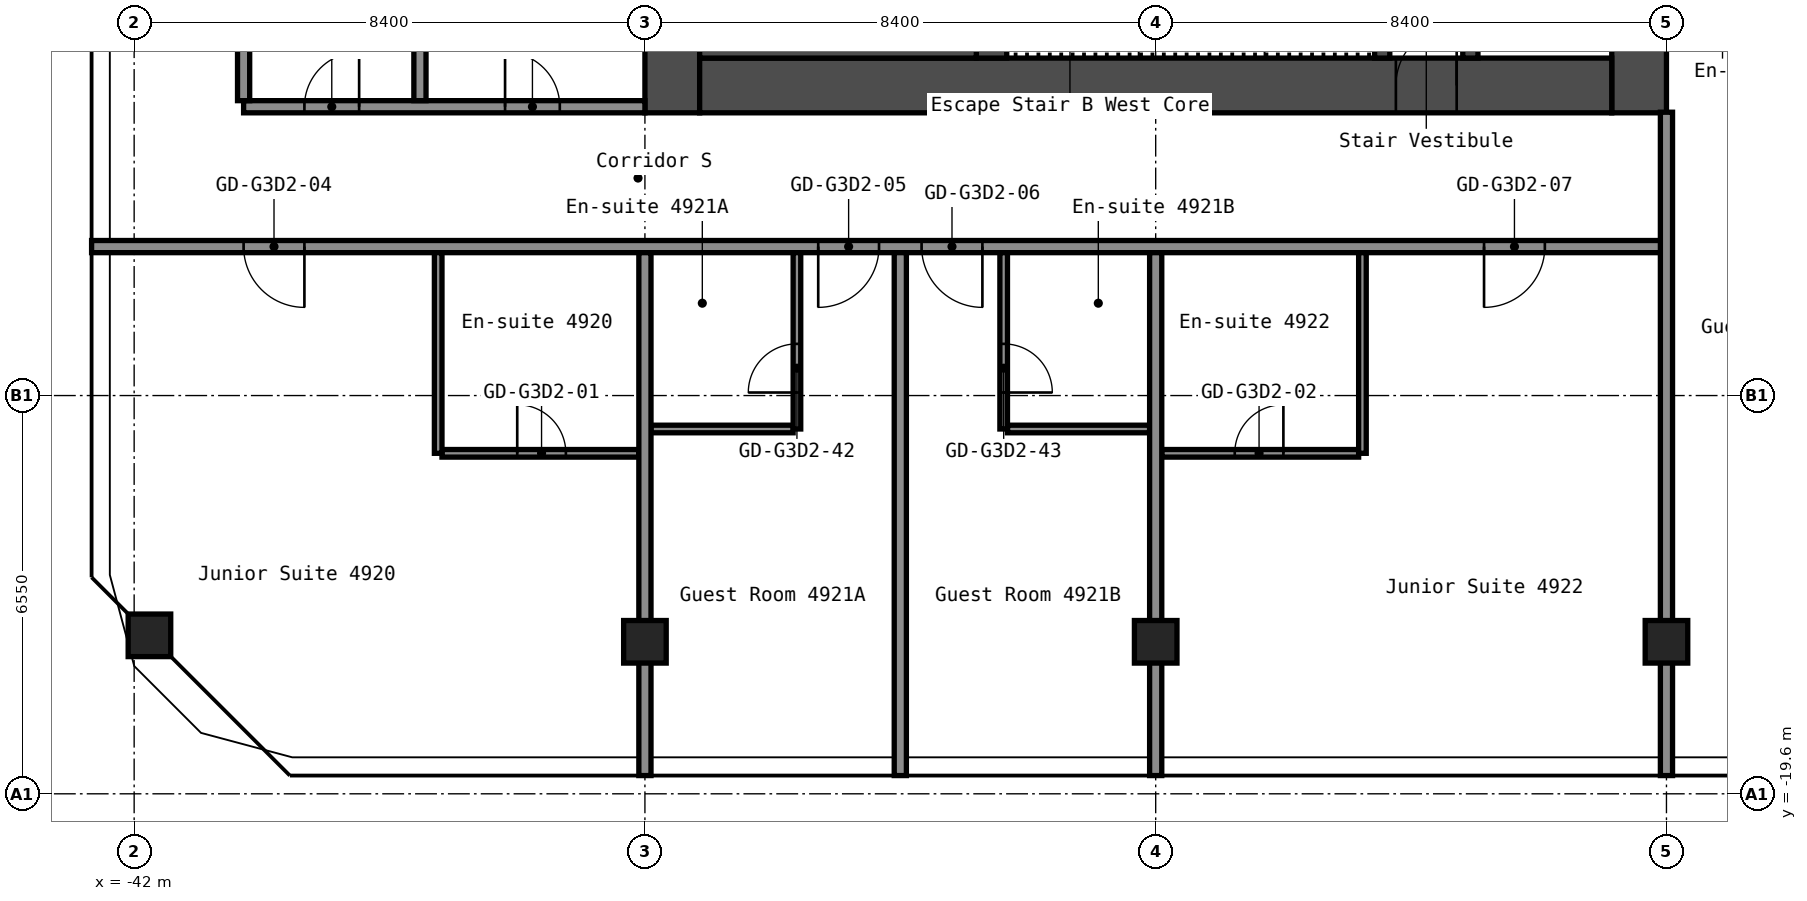
"""IFC4 building model, lengths in metres.
Left out: names, types, materials, properties, quantities, classifications, styles, units other than length and angle.
Written with IfcOpenShell. Run it as: python <this file> out.ifc"""

import sys

from ifc_helpers import new_model, si_unit, direction, frame, frame_2d, origin, origin_2d, place, context, subcontext, project, spatial, rectangle, hollow_rectangle, extrude, element, fill, save


model = new_model("IFC4")
c1 = context("Model", 3, precision=1e-05, world=origin(), true_north=direction((0.0, 1.0)))
c2 = subcontext(c1, "Body", "Model", "MODEL_VIEW")
j1 = project(units=[si_unit("LENGTHUNIT", "METRE"), si_unit("PLANEANGLEUNIT", "RADIAN")], contexts=[c1])
p1 = place(None, origin())
s1 = spatial("IfcSite", under=j1, at=p1, CompositionType="ELEMENT")
p2 = place(p1, origin())
s2 = spatial("IfcBuilding", under=s1, at=p2, CompositionType="ELEMENT")
p3 = place(p2, frame((0.0, 0.0, 172.6)))
s3 = spatial("IfcBuildingStorey", under=s2, at=p3, CompositionType="ELEMENT", Elevation=172.6)
for number, where, z_axis, x_axis in (
    (1, (-41.749, -16.994, 0.0), (0.0, 0.0, 1.0), (1.0, 0.0, 0.0)),
    (2, (-33.6, -17.1, 0.0), (0.0, 0.0, 1.0), (1.0, 0.0, 0.0)),
    (3, (-25.2, -17.1, 0.0), (0.0, 0.0, 1.0), (1.0, 0.0, 0.0)),
    (4, (-16.8, -17.1, 0.0), (0.0, 0.0, 1.0), (1.0, 0.0, 0.0)),
):
    element("IfcColumn", number, at=place(p3, frame(where, z_axis=z_axis, x_axis=x_axis)), inside=s3, PredefinedType="COLUMN", context=c2, shape_type="SweptSolid", body=[
        extrude(hollow_rectangle(XDim=0.7, YDim=0.7, WallThickness=0.028, at=origin_2d()), origin(), (0.0, 0.0, 1.0), 2.9),
    ])
p4 = place(p3, frame((-17.25, -8.4, 0.0), z_axis=(0.0, 0.0, 1.0), x_axis=(0.0, 1.0, 0.0)))
e5 = element("IfcWall", 5, at=p4, inside=s3, PredefinedType="SHEAR", context=c2, shape_type="SweptSolid", body=[
    extrude(rectangle(XDim=16.8, YDim=0.9, at=frame_2d((8.4, 0.0))), origin(), (0.0, 0.0, 1.0), 2.9),
])
p5 = place(p4, frame((7.1, 0.0, 0.0)))
e6 = element("IfcOpeningElement", 6, at=p5, cuts=e5, PredefinedType="OPENING", context=c2, shape_type="SweptSolid", body=[
    extrude(rectangle(XDim=1.6, YDim=2.1, at=frame_2d((0.8, 1.05))), frame((0.0, 0.46, 0.0), z_axis=(0.0, -1.0, 0.0), x_axis=(1.0, 0.0, 0.0)), (0.0, 0.0, 1.0), 0.92),
])
p6 = place(p3, frame((-33.15, -8.4, 0.0), z_axis=(0.0, 0.0, 1.0), x_axis=(0.0, 1.0, 0.0)))
e7 = element("IfcWall", 7, at=p6, inside=s3, PredefinedType="SHEAR", context=c2, shape_type="SweptSolid", body=[
    extrude(rectangle(XDim=16.8, YDim=0.9, at=frame_2d((8.4, 0.0))), origin(), (0.0, 0.0, 1.0), 2.9),
])
p7 = place(p3, frame((-32.7, -7.95, 0.0), z_axis=(0.0, 0.0, 1.0), x_axis=(1.0, 0.0, 0.0)))
e8 = element("IfcWall", 8, at=p7, inside=s3, PredefinedType="SHEAR", context=c2, shape_type="SweptSolid", body=[
    extrude(rectangle(XDim=15.0, YDim=0.9, at=frame_2d((7.5, 0.0))), origin(), (0.0, 0.0, 1.0), 2.9),
])
p8 = place(p7, frame((11.45, 0.0, 0.0)))
e9 = element("IfcOpeningElement", 9, at=p8, cuts=e8, PredefinedType="OPENING", context=c2, shape_type="SweptSolid", body=[
    extrude(rectangle(XDim=1.0, YDim=2.1, at=frame_2d((0.5, 1.05))), frame((0.0, 0.46, 0.0), z_axis=(0.0, -1.0, 0.0), x_axis=(1.0, 0.0, 0.0)), (0.0, 0.0, 1.0), 0.92),
])
p9 = place(p3, frame((-20.025, -7.5, 0.0), z_axis=(0.0, 0.0, 1.0), x_axis=(0.0, 1.0, 0.0)))
e10 = element("IfcWall", 10, at=p9, inside=s3, PredefinedType="SHEAR", context=c2, shape_type="SweptSolid", body=[
    extrude(rectangle(XDim=6.3, YDim=0.25, at=frame_2d((3.15, 0.0))), origin(), (0.0, 0.0, 1.0), 2.9),
])
p10 = place(p9, frame((2.4, 0.0, 0.0)))
e11 = element("IfcOpeningElement", 11, at=p10, cuts=e10, PredefinedType="OPENING", context=c2, shape_type="SweptSolid", body=[
    extrude(rectangle(XDim=1.0, YDim=2.1, at=frame_2d((0.5, 1.05))), frame((0.0, 0.135, 0.0), z_axis=(0.0, -1.0, 0.0), x_axis=(1.0, 0.0, 0.0)), (0.0, 0.0, 1.0), 0.27),
])
p11 = place(p3, frame((-21.475, -7.5, 0.0), z_axis=(0.0, 0.0, 1.0), x_axis=(0.0, 1.0, 0.0)))
e12 = element("IfcWall", 12, at=p11, inside=s3, PredefinedType="SHEAR", context=c2, shape_type="SweptSolid", body=[
    extrude(rectangle(XDim=3.75, YDim=0.25, at=frame_2d((1.875, 0.0))), origin(), (0.0, 0.0, 1.0), 2.9),
])
p12 = place(p11, frame((1.3, 0.0, 0.0)))
e13 = element("IfcOpeningElement", 13, at=p12, cuts=e12, PredefinedType="OPENING", context=c2, shape_type="SweptSolid", body=[
    extrude(rectangle(XDim=1.2, YDim=2.1, at=frame_2d((0.6, 1.05))), frame((0.0, 0.135, 0.0), z_axis=(0.0, -1.0, 0.0), x_axis=(1.0, 0.0, 0.0)), (0.0, 0.0, 1.0), 0.27),
])
p13 = place(p3, frame((-27.9, -7.5, 0.0), z_axis=(0.0, 0.0, 1.0), x_axis=(0.0, 1.0, 0.0)))
e14 = element("IfcWall", 14, at=p13, inside=s3, PredefinedType="SHEAR", context=c2, shape_type="SweptSolid", body=[
    extrude(rectangle(XDim=3.75, YDim=0.5, at=frame_2d((1.875, 0.0))), origin(), (0.0, 0.0, 1.0), 2.9),
])
p14 = place(p3, frame((-32.7, -6.75, 0.0), z_axis=(0.0, 0.0, 1.0), x_axis=(1.0, 0.0, 0.0)))
e15 = element("IfcWall", 15, at=p14, inside=s3, PredefinedType="SHEAR", context=c2, shape_type="SweptSolid", body=[
    extrude(rectangle(XDim=4.55, YDim=1.5, at=frame_2d((2.275, 0.0))), origin(), (0.0, 0.0, 1.0), 2.9),
])
p15 = place(p3, frame((-36.938, -14.0, 0.0), z_axis=(0.0, 0.0, 1.0), x_axis=(1.0, 0.0, 0.0)))
e16 = element("IfcWall", 16, at=p15, inside=s3, PredefinedType="PARTITIONING", context=c2, shape_type="SweptSolid", body=[
    extrude(rectangle(XDim=3.238, YDim=0.125, at=frame_2d((1.619, 0.0))), origin(), (0.0, 0.0, 1.0), 2.9),
])
p16 = place(p15, frame((1.238, 0.0, 0.0)))
e17 = element("IfcOpeningElement", 17, at=p16, cuts=e16, PredefinedType="OPENING", context=c2, shape_type="SweptSolid", body=[
    extrude(rectangle(XDim=0.8, YDim=2.1, at=frame_2d((0.4, 1.05))), frame((0.0, 0.073, 0.0), z_axis=(0.0, -1.0, 0.0), x_axis=(1.0, 0.0, 0.0)), (0.0, 0.0, 1.0), 0.145),
])
p17 = place(p3, frame((-25.1, -14.0, 0.0), z_axis=(0.0, 0.0, 1.0), x_axis=(1.0, 0.0, 0.0)))
e18 = element("IfcWall", 18, at=p17, inside=s3, PredefinedType="PARTITIONING", context=c2, shape_type="SweptSolid", body=[
    extrude(rectangle(XDim=3.238, YDim=0.125, at=frame_2d((1.619, 0.0))), origin(), (0.0, 0.0, 1.0), 2.9),
])
p18 = place(p17, frame((1.2, 0.0, 0.0)))
e19 = element("IfcOpeningElement", 19, at=p18, cuts=e18, PredefinedType="OPENING", context=c2, shape_type="SweptSolid", body=[
    extrude(rectangle(XDim=0.8, YDim=2.1, at=frame_2d((0.4, 1.05))), frame((0.0, 0.073, 0.0), z_axis=(0.0, -1.0, 0.0), x_axis=(1.0, 0.0, 0.0)), (0.0, 0.0, 1.0), 0.145),
])
for number, where, z_axis, x_axis in (
    (20, (-33.5, -13.6, 0.0), (0.0, 0.0, 1.0), (1.0, 0.0, 0.0)),
    (21, (-27.637, -13.6, 0.0), (0.0, 0.0, 1.0), (1.0, 0.0, 0.0)),
):
    element("IfcWall", number, at=place(p3, frame(where, z_axis=z_axis, x_axis=x_axis)), inside=s3, PredefinedType="PARTITIONING", context=c2, shape_type="SweptSolid", body=[
        extrude(rectangle(XDim=2.337, YDim=0.125, at=frame_2d((1.169, 0.0))), origin(), (0.0, 0.0, 1.0), 2.9),
    ])
p19 = place(p3, frame((-42.7, -10.6, 0.0), z_axis=(0.0, 0.0, 1.0), x_axis=(1.0, 0.0, 0.0)))
e22 = element("IfcWall", 22, at=p19, inside=s3, PredefinedType="PARTITIONING", context=c2, shape_type="SweptSolid", body=[
    extrude(rectangle(XDim=25.9, YDim=0.2, at=frame_2d((12.95, 0.0))), origin(), (0.0, 0.0, 1.0), 2.9),
])
p20 = place(p19, frame((2.5, 0.0, 0.0)))
e23 = element("IfcOpeningElement", 23, at=p20, cuts=e22, PredefinedType="OPENING", context=c2, shape_type="SweptSolid", body=[
    extrude(rectangle(XDim=1.0, YDim=2.1, at=frame_2d((0.5, 1.05))), frame((0.0, 0.11, 0.0), z_axis=(0.0, -1.0, 0.0), x_axis=(1.0, 0.0, 0.0)), (0.0, 0.0, 1.0), 0.22),
])
p21 = place(p19, frame((11.95, 0.0, 0.0)))
e24 = element("IfcOpeningElement", 24, at=p21, cuts=e22, PredefinedType="OPENING", context=c2, shape_type="SweptSolid", body=[
    extrude(rectangle(XDim=1.0, YDim=2.1, at=frame_2d((0.5, 1.05))), frame((0.0, 0.11, 0.0), z_axis=(0.0, -1.0, 0.0), x_axis=(1.0, 0.0, 0.0)), (0.0, 0.0, 1.0), 0.22),
])
p22 = place(p19, frame((13.65, 0.0, 0.0)))
e25 = element("IfcOpeningElement", 25, at=p22, cuts=e22, PredefinedType="OPENING", context=c2, shape_type="SweptSolid", body=[
    extrude(rectangle(XDim=1.0, YDim=2.1, at=frame_2d((0.5, 1.05))), frame((0.0, 0.11, 0.0), z_axis=(0.0, -1.0, 0.0), x_axis=(1.0, 0.0, 0.0)), (0.0, 0.0, 1.0), 0.22),
])
p23 = place(p19, frame((22.9, 0.0, 0.0)))
e26 = element("IfcOpeningElement", 26, at=p23, cuts=e22, PredefinedType="OPENING", context=c2, shape_type="SweptSolid", body=[
    extrude(rectangle(XDim=1.0, YDim=2.1, at=frame_2d((0.5, 1.05))), frame((0.0, 0.11, 0.0), z_axis=(0.0, -1.0, 0.0), x_axis=(1.0, 0.0, 0.0)), (0.0, 0.0, 1.0), 0.22),
])
p24 = place(p3, frame((-40.2, -8.3, 0.0), z_axis=(0.0, 0.0, 1.0), x_axis=(1.0, 0.0, 0.0)))
e27 = element("IfcWall", 27, at=p24, inside=s3, PredefinedType="PARTITIONING", context=c2, shape_type="SweptSolid", body=[
    extrude(rectangle(XDim=6.6, YDim=0.2, at=frame_2d((3.3, 0.0))), origin(), (0.0, 0.0, 1.0), 2.9),
])
p25 = place(p24, frame((1.0, 0.0, 0.0)))
e28 = element("IfcOpeningElement", 28, at=p25, cuts=e27, PredefinedType="OPENING", context=c2, shape_type="SweptSolid", body=[
    extrude(rectangle(XDim=0.9, YDim=2.1, at=frame_2d((0.45, 1.05))), frame((0.0, 0.11, 0.0), z_axis=(0.0, -1.0, 0.0), x_axis=(1.0, 0.0, 0.0)), (0.0, 0.0, 1.0), 0.22),
])
p26 = place(p24, frame((4.3, 0.0, 0.0)))
e29 = element("IfcOpeningElement", 29, at=p26, cuts=e27, PredefinedType="OPENING", context=c2, shape_type="SweptSolid", body=[
    extrude(rectangle(XDim=0.9, YDim=2.1, at=frame_2d((0.45, 1.05))), frame((0.0, 0.11, 0.0), z_axis=(0.0, -1.0, 0.0), x_axis=(1.0, 0.0, 0.0)), (0.0, 0.0, 1.0), 0.22),
])
p27 = place(p3, frame((-40.2, -8.2, 0.0), z_axis=(0.0, 0.0, 1.0), x_axis=(0.0, 1.0, 0.0)))
e30 = element("IfcWall", 30, at=p27, inside=s3, PredefinedType="PARTITIONING", context=c2, shape_type="SweptSolid", body=[
    extrude(rectangle(XDim=16.4, YDim=0.2, at=frame_2d((8.2, 0.0))), origin(), (0.0, 0.0, 1.0), 2.9),
])
p28 = place(p3, frame((-37.3, -8.2, 0.0), z_axis=(0.0, 0.0, 1.0), x_axis=(0.0, 1.0, 0.0)))
e31 = element("IfcWall", 31, at=p28, inside=s3, PredefinedType="PARTITIONING", context=c2, shape_type="SweptSolid", body=[
    extrude(rectangle(XDim=8.2, YDim=0.2, at=frame_2d((4.1, 0.0))), origin(), (0.0, 0.0, 1.0), 2.9),
])
p29 = place(p3, frame((-37.0, -14.0, 0.0), z_axis=(0.0, 0.0, 1.0), x_axis=(0.0, 1.0, 0.0)))
e32 = element("IfcWall", 32, at=p29, inside=s3, PredefinedType="PARTITIONING", context=c2, shape_type="SweptSolid", body=[
    extrude(rectangle(XDim=3.3, YDim=0.125, at=frame_2d((1.65, 0.0))), origin(), (0.0, 0.0, 1.0), 2.9),
])
p30 = place(p3, frame((-33.6, -19.3, 0.0), z_axis=(0.0, 0.0, 1.0), x_axis=(0.0, 1.0, 0.0)))
e33 = element("IfcWall", 33, at=p30, inside=s3, PredefinedType="PARTITIONING", context=c2, shape_type="SweptSolid", body=[
    extrude(rectangle(XDim=8.6, YDim=0.2, at=frame_2d((4.3, 0.0))), origin(), (0.0, 0.0, 1.0), 2.9),
])
p31 = place(p3, frame((-31.1, -13.6, 0.0), z_axis=(0.0, 0.0, 1.0), x_axis=(0.0, 1.0, 0.0)))
e34 = element("IfcWall", 34, at=p31, inside=s3, PredefinedType="PARTITIONING", context=c2, shape_type="SweptSolid", body=[
    extrude(rectangle(XDim=2.9, YDim=0.125, at=frame_2d((1.45, 0.0))), origin(), (0.0, 0.0, 1.0), 2.9),
])
p32 = place(p31, frame((0.6, 0.0, 0.0)))
e35 = element("IfcOpeningElement", 35, at=p32, cuts=e34, PredefinedType="OPENING", context=c2, shape_type="SweptSolid", body=[
    extrude(rectangle(XDim=0.8, YDim=2.1, at=frame_2d((0.4, 1.05))), frame((0.0, 0.073, 0.0), z_axis=(0.0, -1.0, 0.0), x_axis=(1.0, 0.0, 0.0)), (0.0, 0.0, 1.0), 0.145),
])
p33 = place(p3, frame((-29.4, -19.3, 0.0), z_axis=(0.0, 0.0, 1.0), x_axis=(0.0, 1.0, 0.0)))
e36 = element("IfcWall", 36, at=p33, inside=s3, PredefinedType="PARTITIONING", context=c2, shape_type="SweptSolid", body=[
    extrude(rectangle(XDim=8.6, YDim=0.2, at=frame_2d((4.3, 0.0))), origin(), (0.0, 0.0, 1.0), 2.9),
])
p34 = place(p3, frame((-27.7, -13.6, 0.0), z_axis=(0.0, 0.0, 1.0), x_axis=(0.0, 1.0, 0.0)))
e37 = element("IfcWall", 37, at=p34, inside=s3, PredefinedType="PARTITIONING", context=c2, shape_type="SweptSolid", body=[
    extrude(rectangle(XDim=2.9, YDim=0.125, at=frame_2d((1.45, 0.0))), origin(), (0.0, 0.0, 1.0), 2.9),
])
p35 = place(p34, frame((0.6, 0.0, 0.0)))
e38 = element("IfcOpeningElement", 38, at=p35, cuts=e37, PredefinedType="OPENING", context=c2, shape_type="SweptSolid", body=[
    extrude(rectangle(XDim=0.8, YDim=2.1, at=frame_2d((0.4, 1.05))), frame((0.0, 0.073, 0.0), z_axis=(0.0, -1.0, 0.0), x_axis=(1.0, 0.0, 0.0)), (0.0, 0.0, 1.0), 0.145),
])
p36 = place(p3, frame((-25.2, -19.3, 0.0), z_axis=(0.0, 0.0, 1.0), x_axis=(0.0, 1.0, 0.0)))
e39 = element("IfcWall", 39, at=p36, inside=s3, PredefinedType="PARTITIONING", context=c2, shape_type="SweptSolid", body=[
    extrude(rectangle(XDim=8.6, YDim=0.2, at=frame_2d((4.3, 0.0))), origin(), (0.0, 0.0, 1.0), 2.9),
])
p37 = place(p3, frame((-21.8, -14.0, 0.0), z_axis=(0.0, 0.0, 1.0), x_axis=(0.0, 1.0, 0.0)))
e40 = element("IfcWall", 40, at=p37, inside=s3, PredefinedType="PARTITIONING", context=c2, shape_type="SweptSolid", body=[
    extrude(rectangle(XDim=3.3, YDim=0.125, at=frame_2d((1.65, 0.0))), origin(), (0.0, 0.0, 1.0), 2.9),
])
p38 = place(p3, frame((-16.8, -19.3, 0.0), z_axis=(0.0, 0.0, 1.0), x_axis=(0.0, 1.0, 0.0)))
e41 = element("IfcWall", 41, at=p38, inside=s3, PredefinedType="PARTITIONING", context=c2, shape_type="SweptSolid", body=[
    extrude(rectangle(XDim=10.91, YDim=0.2, at=frame_2d((5.455, 0.0))), origin(), (0.0, 0.0, 1.0), 2.9),
])
p39 = place(p8, origin())
e42 = element("IfcDoor", 42, at=p39, inside=s3, OperationType="SINGLE_SWING_LEFT", PredefinedType="DOOR", context=c2, shape_type="SweptSolid", body=[
    extrude(rectangle(XDim=1.0, YDim=2.1, at=frame_2d((0.5, 1.05))), frame((0.0, 0.025, 0.0), z_axis=(0.0, -1.0, 0.0), x_axis=(1.0, 0.0, 0.0)), (0.0, 0.0, 1.0), 0.05),
])
fill(e9, e42)
p40 = place(p16, origin())
e43 = element("IfcDoor", 43, at=p40, inside=s3, OperationType="SINGLE_SWING_RIGHT", PredefinedType="DOOR", context=c2, shape_type="SweptSolid", body=[
    extrude(rectangle(XDim=0.8, YDim=2.1, at=frame_2d((0.4, 1.05))), frame((0.0, 0.025, 0.0), z_axis=(0.0, -1.0, 0.0), x_axis=(1.0, 0.0, 0.0)), (0.0, 0.0, 1.0), 0.05),
])
fill(e17, e43)
p41 = place(p18, origin())
e44 = element("IfcDoor", 44, at=p41, inside=s3, OperationType="SINGLE_SWING_LEFT", PredefinedType="DOOR", context=c2, shape_type="SweptSolid", body=[
    extrude(rectangle(XDim=0.8, YDim=2.1, at=frame_2d((0.4, 1.05))), frame((0.0, 0.025, 0.0), z_axis=(0.0, -1.0, 0.0), x_axis=(1.0, 0.0, 0.0)), (0.0, 0.0, 1.0), 0.05),
])
fill(e19, e44)
p42 = place(p20, origin())
e45 = element("IfcDoor", 45, at=p42, inside=s3, OperationType="SINGLE_SWING_RIGHT", PredefinedType="DOOR", context=c2, shape_type="SweptSolid", body=[
    extrude(rectangle(XDim=1.0, YDim=2.1, at=frame_2d((0.5, 1.05))), frame((0.0, 0.025, 0.0), z_axis=(0.0, -1.0, 0.0), x_axis=(1.0, 0.0, 0.0)), (0.0, 0.0, 1.0), 0.05),
])
fill(e23, e45)
p43 = place(p21, origin())
e46 = element("IfcDoor", 46, at=p43, inside=s3, OperationType="SINGLE_SWING_LEFT", PredefinedType="DOOR", context=c2, shape_type="SweptSolid", body=[
    extrude(rectangle(XDim=1.0, YDim=2.1, at=frame_2d((0.5, 1.05))), frame((0.0, 0.025, 0.0), z_axis=(0.0, -1.0, 0.0), x_axis=(1.0, 0.0, 0.0)), (0.0, 0.0, 1.0), 0.05),
])
fill(e24, e46)
p44 = place(p22, origin())
e47 = element("IfcDoor", 47, at=p44, inside=s3, OperationType="SINGLE_SWING_RIGHT", PredefinedType="DOOR", context=c2, shape_type="SweptSolid", body=[
    extrude(rectangle(XDim=1.0, YDim=2.1, at=frame_2d((0.5, 1.05))), frame((0.0, 0.025, 0.0), z_axis=(0.0, -1.0, 0.0), x_axis=(1.0, 0.0, 0.0)), (0.0, 0.0, 1.0), 0.05),
])
fill(e25, e47)
p45 = place(p23, origin())
e48 = element("IfcDoor", 48, at=p45, inside=s3, OperationType="SINGLE_SWING_LEFT", PredefinedType="DOOR", context=c2, shape_type="SweptSolid", body=[
    extrude(rectangle(XDim=1.0, YDim=2.1, at=frame_2d((0.5, 1.05))), frame((0.0, 0.025, 0.0), z_axis=(0.0, -1.0, 0.0), x_axis=(1.0, 0.0, 0.0)), (0.0, 0.0, 1.0), 0.05),
])
fill(e26, e48)
p46 = place(p25, origin())
e49 = element("IfcDoor", 49, at=p46, inside=s3, OperationType="SINGLE_SWING_LEFT", PredefinedType="DOOR", context=c2, shape_type="SweptSolid", body=[
    extrude(rectangle(XDim=0.9, YDim=2.1, at=frame_2d((0.45, 1.05))), frame((0.0, 0.025, 0.0), z_axis=(0.0, -1.0, 0.0), x_axis=(1.0, 0.0, 0.0)), (0.0, 0.0, 1.0), 0.05),
])
fill(e28, e49)
p47 = place(p26, origin())
e50 = element("IfcDoor", 50, at=p47, inside=s3, OperationType="SINGLE_SWING_RIGHT", PredefinedType="DOOR", context=c2, shape_type="SweptSolid", body=[
    extrude(rectangle(XDim=0.9, YDim=2.1, at=frame_2d((0.45, 1.05))), frame((0.0, 0.025, 0.0), z_axis=(0.0, -1.0, 0.0), x_axis=(1.0, 0.0, 0.0)), (0.0, 0.0, 1.0), 0.05),
])
fill(e29, e50)
p48 = place(p32, origin())
e51 = element("IfcDoor", 51, at=p48, inside=s3, OperationType="SINGLE_SWING_RIGHT", PredefinedType="DOOR", context=c2, shape_type="SweptSolid", body=[
    extrude(rectangle(XDim=0.8, YDim=2.1, at=frame_2d((0.4, 1.05))), frame((0.0, 0.025, 0.0), z_axis=(0.0, -1.0, 0.0), x_axis=(1.0, 0.0, 0.0)), (0.0, 0.0, 1.0), 0.05),
])
fill(e35, e51)
p49 = place(p35, origin())
e52 = element("IfcDoor", 52, at=p49, inside=s3, OperationType="SINGLE_SWING_LEFT", PredefinedType="DOOR", context=c2, shape_type="SweptSolid", body=[
    extrude(rectangle(XDim=0.8, YDim=2.1, at=frame_2d((0.4, 1.05))), frame((0.0, 0.025, 0.0), z_axis=(0.0, -1.0, 0.0), x_axis=(1.0, 0.0, 0.0)), (0.0, 0.0, 1.0), 0.05),
])
fill(e38, e52)
save(model, sys.argv[1])
